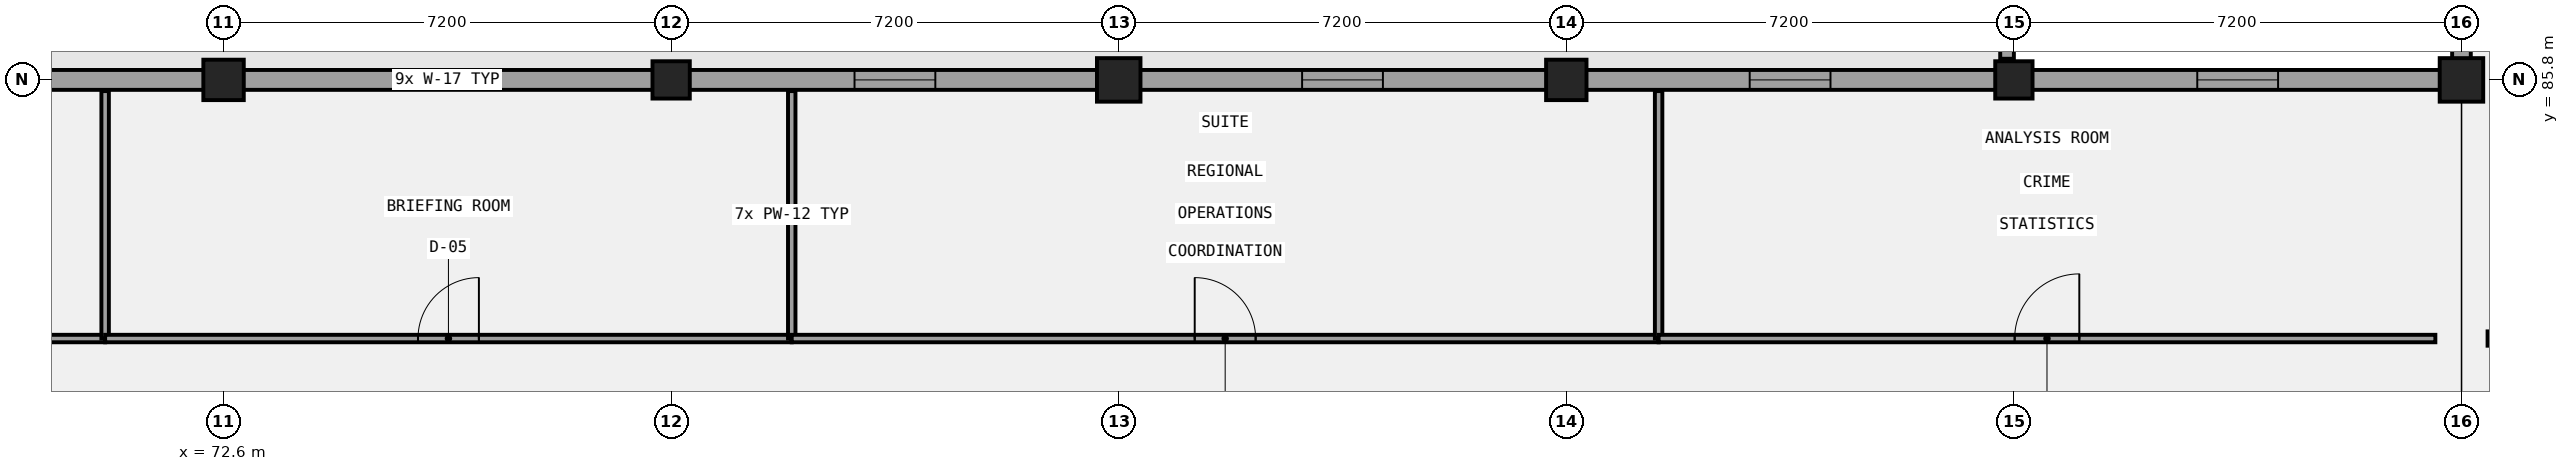
"""IFC4 building model, lengths in metres.
Left out: names, types, materials, properties, quantities, classifications, styles, units other than length and angle.
Written with IfcOpenShell. Run it as: python <this file> out.ifc"""

import sys

from ifc_helpers import new_model, si_unit, direction, frame, frame_2d, origin, origin_2d, place, context, subcontext, project, spatial, rectangle, extrude, element, fill, save


model = new_model("IFC4")
c1 = context("Model", 3, precision=1e-05, world=origin(), true_north=direction((0.0, 1.0)))
c2 = subcontext(c1, "Body", "Model", "MODEL_VIEW")
j1 = project(units=[si_unit("LENGTHUNIT", "METRE"), si_unit("PLANEANGLEUNIT", "RADIAN")], contexts=[c1])
p1 = place(None, origin())
s1 = spatial("IfcSite", under=j1, at=p1, CompositionType="ELEMENT")
p2 = place(p1, origin())
s2 = spatial("IfcBuilding", under=s1, at=p2, CompositionType="ELEMENT")
p3 = place(p2, frame((0.0, 0.0, 9.6)))
s3 = spatial("IfcBuildingStorey", under=s2, at=p3, CompositionType="ELEMENT", Elevation=9.6)
p4 = place(p3, frame((72.6, 85.8, 0.0), z_axis=(0.0, 0.0, 1.0), x_axis=(1.0, 0.0, 0.0)))
e1 = element("IfcColumn", 1, at=p4, inside=s3, PredefinedType="COLUMN", context=c2, shape_type="SweptSolid", body=[
    extrude(rectangle(XDim=0.65, YDim=0.65, at=origin_2d()), origin(), (0.0, 0.0, 1.0), 4.2),
])
p5 = place(p3, frame((79.8, 85.8, 0.0), z_axis=(0.0, 0.0, 1.0), x_axis=(1.0, 0.0, 0.0)))
e2 = element("IfcColumn", 2, at=p5, inside=s3, PredefinedType="COLUMN", context=c2, shape_type="SweptSolid", body=[
    extrude(rectangle(XDim=0.6, YDim=0.6, at=origin_2d()), origin(), (0.0, 0.0, 1.0), 4.2),
])
p6 = place(p3, frame((87.0, 85.8, 0.0), z_axis=(0.0, 0.0, 1.0), x_axis=(1.0, 0.0, 0.0)))
e3 = element("IfcColumn", 3, at=p6, inside=s3, PredefinedType="COLUMN", context=c2, shape_type="SweptSolid", body=[
    extrude(rectangle(XDim=0.7, YDim=0.7, at=origin_2d()), origin(), (0.0, 0.0, 1.0), 4.2),
])
p7 = place(p3, frame((94.2, 85.8, 0.0), z_axis=(0.0, 0.0, 1.0), x_axis=(1.0, 0.0, 0.0)))
e4 = element("IfcColumn", 4, at=p7, inside=s3, PredefinedType="COLUMN", context=c2, shape_type="SweptSolid", body=[
    extrude(rectangle(XDim=0.65, YDim=0.65, at=origin_2d()), origin(), (0.0, 0.0, 1.0), 4.2),
])
p8 = place(p3, frame((101.4, 85.8, 0.0), z_axis=(0.0, 0.0, 1.0), x_axis=(1.0, 0.0, 0.0)))
e5 = element("IfcColumn", 5, at=p8, inside=s3, PredefinedType="COLUMN", context=c2, shape_type="SweptSolid", body=[
    extrude(rectangle(XDim=0.6, YDim=0.6, at=origin_2d()), origin(), (0.0, 0.0, 1.0), 4.2),
])
p9 = place(p3, frame((108.6, 85.8, 0.0), z_axis=(0.0, 0.0, 1.0), x_axis=(1.0, 0.0, 0.0)))
e6 = element("IfcColumn", 6, at=p9, inside=s3, PredefinedType="COLUMN", context=c2, shape_type="SweptSolid", body=[
    extrude(rectangle(XDim=0.7, YDim=0.7, at=origin_2d()), origin(), (0.0, 0.0, 1.0), 4.2),
])
p10 = place(p3, frame((108.6, 92.81, 0.0), z_axis=(0.0, 0.0, 1.0), x_axis=(0.0, -1.0, 0.0)))
e7 = element("IfcWall", 7, at=p10, inside=s3, PredefinedType="SOLIDWALL", context=c2, shape_type="SweptSolid", body=[
    extrude(rectangle(XDim=6.86, YDim=0.3, at=frame_2d((3.43, 0.0))), origin(), (0.0, 0.0, 1.0), 3.04),
])
p11 = place(p10, frame((2.63, 0.0, 0.95)))
e8 = element("IfcOpeningElement", 8, at=p11, cuts=e7, PredefinedType="OPENING", context=c2, shape_type="SweptSolid", body=[
    extrude(rectangle(XDim=1.6, YDim=1.4, at=frame_2d((0.8, 0.7))), frame((0.0, 0.16, 0.0), z_axis=(0.0, -1.0, 0.0), x_axis=(1.0, 0.0, 0.0)), (0.0, 0.0, 1.0), 0.32),
])
p12 = place(p3, frame((108.76, 85.8, 0.0), z_axis=(0.0, 0.0, 1.0), x_axis=(-1.0, 0.0, 0.0)))
e9 = element("IfcWall", 9, at=p12, inside=s3, PredefinedType="SOLIDWALL", context=c2, shape_type="SweptSolid", body=[
    extrude(rectangle(XDim=101.12, YDim=0.32, at=frame_2d((50.56, 0.0))), origin(), (0.0, 0.0, 1.0), 2.94),
])
p13 = place(p12, frame((89.415, 0.0, 0.0)))
e10 = element("IfcOpeningElement", 10, at=p13, cuts=e9, PredefinedType="OPENING", context=c2, shape_type="SweptSolid", body=[
    extrude(rectangle(XDim=1.4, YDim=2.2, at=frame_2d((0.7, 1.1))), frame((0.0, 0.17, 0.0), z_axis=(0.0, -1.0, 0.0), x_axis=(1.0, 0.0, 0.0)), (0.0, 0.0, 1.0), 0.34),
])
p14 = place(p12, frame((96.71, 0.0, 1.0)))
e11 = element("IfcOpeningElement", 11, at=p14, cuts=e9, PredefinedType="OPENING", context=c2, shape_type="SweptSolid", body=[
    extrude(rectangle(XDim=1.3, YDim=1.65, at=frame_2d((0.65, 0.825))), frame((0.0, 0.17, 0.0), z_axis=(0.0, -1.0, 0.0), x_axis=(1.0, 0.0, 0.0)), (0.0, 0.0, 1.0), 0.34),
])
p15 = place(p12, frame((82.31, 0.0, 1.0)))
e12 = element("IfcOpeningElement", 12, at=p15, cuts=e9, PredefinedType="OPENING", context=c2, shape_type="SweptSolid", body=[
    extrude(rectangle(XDim=1.3, YDim=1.65, at=frame_2d((0.65, 0.825))), frame((0.0, 0.17, 0.0), z_axis=(0.0, -1.0, 0.0), x_axis=(1.0, 0.0, 0.0)), (0.0, 0.0, 1.0), 0.34),
])
p16 = place(p12, frame((75.11, 0.0, 1.0)))
e13 = element("IfcOpeningElement", 13, at=p16, cuts=e9, PredefinedType="OPENING", context=c2, shape_type="SweptSolid", body=[
    extrude(rectangle(XDim=1.3, YDim=1.65, at=frame_2d((0.65, 0.825))), frame((0.0, 0.17, 0.0), z_axis=(0.0, -1.0, 0.0), x_axis=(1.0, 0.0, 0.0)), (0.0, 0.0, 1.0), 0.34),
])
p17 = place(p12, frame((67.91, 0.0, 1.0)))
e14 = element("IfcOpeningElement", 14, at=p17, cuts=e9, PredefinedType="OPENING", context=c2, shape_type="SweptSolid", body=[
    extrude(rectangle(XDim=1.3, YDim=1.65, at=frame_2d((0.65, 0.825))), frame((0.0, 0.17, 0.0), z_axis=(0.0, -1.0, 0.0), x_axis=(1.0, 0.0, 0.0)), (0.0, 0.0, 1.0), 0.34),
])
p18 = place(p12, frame((60.71, 0.0, 1.0)))
e15 = element("IfcOpeningElement", 15, at=p18, cuts=e9, PredefinedType="OPENING", context=c2, shape_type="SweptSolid", body=[
    extrude(rectangle(XDim=1.3, YDim=1.65, at=frame_2d((0.65, 0.825))), frame((0.0, 0.17, 0.0), z_axis=(0.0, -1.0, 0.0), x_axis=(1.0, 0.0, 0.0)), (0.0, 0.0, 1.0), 0.34),
])
p19 = place(p12, frame((53.51, 0.0, 1.0)))
e16 = element("IfcOpeningElement", 16, at=p19, cuts=e9, PredefinedType="OPENING", context=c2, shape_type="SweptSolid", body=[
    extrude(rectangle(XDim=1.3, YDim=1.65, at=frame_2d((0.65, 0.825))), frame((0.0, 0.17, 0.0), z_axis=(0.0, -1.0, 0.0), x_axis=(1.0, 0.0, 0.0)), (0.0, 0.0, 1.0), 0.34),
])
p20 = place(p12, frame((46.31, 0.0, 1.0)))
e17 = element("IfcOpeningElement", 17, at=p20, cuts=e9, PredefinedType="OPENING", context=c2, shape_type="SweptSolid", body=[
    extrude(rectangle(XDim=1.3, YDim=1.65, at=frame_2d((0.65, 0.825))), frame((0.0, 0.17, 0.0), z_axis=(0.0, -1.0, 0.0), x_axis=(1.0, 0.0, 0.0)), (0.0, 0.0, 1.0), 0.34),
])
p21 = place(p12, frame((39.11, 0.0, 1.0)))
e18 = element("IfcOpeningElement", 18, at=p21, cuts=e9, PredefinedType="OPENING", context=c2, shape_type="SweptSolid", body=[
    extrude(rectangle(XDim=1.3, YDim=1.65, at=frame_2d((0.65, 0.825))), frame((0.0, 0.17, 0.0), z_axis=(0.0, -1.0, 0.0), x_axis=(1.0, 0.0, 0.0)), (0.0, 0.0, 1.0), 0.34),
])
p22 = place(p12, frame((31.91, 0.0, 1.0)))
e19 = element("IfcOpeningElement", 19, at=p22, cuts=e9, PredefinedType="OPENING", context=c2, shape_type="SweptSolid", body=[
    extrude(rectangle(XDim=1.3, YDim=1.65, at=frame_2d((0.65, 0.825))), frame((0.0, 0.17, 0.0), z_axis=(0.0, -1.0, 0.0), x_axis=(1.0, 0.0, 0.0)), (0.0, 0.0, 1.0), 0.34),
])
p23 = place(p12, frame((24.71, 0.0, 1.0)))
e20 = element("IfcOpeningElement", 20, at=p23, cuts=e9, PredefinedType="OPENING", context=c2, shape_type="SweptSolid", body=[
    extrude(rectangle(XDim=1.3, YDim=1.65, at=frame_2d((0.65, 0.825))), frame((0.0, 0.17, 0.0), z_axis=(0.0, -1.0, 0.0), x_axis=(1.0, 0.0, 0.0)), (0.0, 0.0, 1.0), 0.34),
])
p24 = place(p12, frame((17.51, 0.0, 1.0)))
e21 = element("IfcOpeningElement", 21, at=p24, cuts=e9, PredefinedType="OPENING", context=c2, shape_type="SweptSolid", body=[
    extrude(rectangle(XDim=1.3, YDim=1.65, at=frame_2d((0.65, 0.825))), frame((0.0, 0.17, 0.0), z_axis=(0.0, -1.0, 0.0), x_axis=(1.0, 0.0, 0.0)), (0.0, 0.0, 1.0), 0.34),
])
p25 = place(p12, frame((10.31, 0.0, 1.0)))
e22 = element("IfcOpeningElement", 22, at=p25, cuts=e9, PredefinedType="OPENING", context=c2, shape_type="SweptSolid", body=[
    extrude(rectangle(XDim=1.3, YDim=1.65, at=frame_2d((0.65, 0.825))), frame((0.0, 0.17, 0.0), z_axis=(0.0, -1.0, 0.0), x_axis=(1.0, 0.0, 0.0)), (0.0, 0.0, 1.0), 0.34),
])
p26 = place(p12, frame((3.11, 0.0, 1.0)))
e23 = element("IfcOpeningElement", 23, at=p26, cuts=e9, PredefinedType="OPENING", context=c2, shape_type="SweptSolid", body=[
    extrude(rectangle(XDim=1.3, YDim=1.65, at=frame_2d((0.65, 0.825))), frame((0.0, 0.17, 0.0), z_axis=(0.0, -1.0, 0.0), x_axis=(1.0, 0.0, 0.0)), (0.0, 0.0, 1.0), 0.34),
])
p27 = place(p3, frame((101.29, 92.816, 0.0), z_axis=(0.0, 0.0, 1.0), x_axis=(0.0, -1.0, 0.0)))
e24 = element("IfcWall", 24, at=p27, inside=s3, PredefinedType="PARAPET", context=c2, shape_type="SweptSolid", body=[
    extrude(rectangle(XDim=6.676, YDim=0.22, at=frame_2d((3.338, 0.0))), origin(), (0.0, 0.0, 1.0), 1.12),
])
p28 = place(p3, frame((109.02, 81.64, 0.0), z_axis=(0.0, 0.0, 1.0), x_axis=(1.0, 0.0, 0.0)))
e25 = element("IfcWall", 25, at=p28, inside=s3, PredefinedType="PARTITIONING", context=c2, shape_type="SweptSolid", body=[
    extrude(rectangle(XDim=5.86, YDim=0.23, at=frame_2d((2.93, 0.0))), origin(), (0.0, 0.0, 1.0), 3.94),
])
p29 = place(p28, frame((2.44, 0.0, 0.0)))
e26 = element("IfcOpeningElement", 26, at=p29, cuts=e25, PredefinedType="OPENING", context=c2, shape_type="SweptSolid", body=[
    extrude(rectangle(XDim=0.98, YDim=2.1, at=frame_2d((0.49, 1.05))), frame((0.0, 0.125, 0.0), z_axis=(0.0, -1.0, 0.0), x_axis=(1.0, 0.0, 0.0)), (0.0, 0.0, 1.0), 0.25),
])
p30 = place(p3, frame((58.2, 81.64, 0.0), z_axis=(0.0, 0.0, 1.0), x_axis=(1.0, 0.0, 0.0)))
e27 = element("IfcWall", 27, at=p30, inside=s3, PredefinedType="PARTITIONING", context=c2, shape_type="SweptSolid", body=[
    extrude(rectangle(XDim=12.495, YDim=0.12, at=frame_2d((6.248, 0.0))), origin(), (0.0, 0.0, 1.0), 3.94),
])
p31 = place(p30, frame((5.758, 0.0, 0.0)))
e28 = element("IfcOpeningElement", 28, at=p31, cuts=e27, PredefinedType="OPENING", context=c2, shape_type="SweptSolid", body=[
    extrude(rectangle(XDim=0.98, YDim=2.1, at=frame_2d((0.49, 1.05))), frame((0.0, 0.07, 0.0), z_axis=(0.0, -1.0, 0.0), x_axis=(1.0, 0.0, 0.0)), (0.0, 0.0, 1.0), 0.14),
])
p32 = place(p3, frame((70.695, 81.64, 0.0), z_axis=(0.0, 0.0, 1.0), x_axis=(0.0, 1.0, 0.0)))
e29 = element("IfcWall", 29, at=p32, inside=s3, PredefinedType="PARTITIONING", context=c2, shape_type="SweptSolid", body=[
    extrude(rectangle(XDim=3.98, YDim=0.12, at=frame_2d((1.99, 0.0))), origin(), (0.0, 0.0, 1.0), 3.94),
])
p33 = place(p3, frame((70.695, 81.64, 0.0), z_axis=(0.0, 0.0, 1.0), x_axis=(1.0, 0.0, 0.0)))
e30 = element("IfcWall", 30, at=p33, inside=s3, PredefinedType="PARTITIONING", context=c2, shape_type="SweptSolid", body=[
    extrude(rectangle(XDim=11.045, YDim=0.12, at=frame_2d((5.522, 0.0))), origin(), (0.0, 0.0, 1.0), 3.94),
])
p34 = place(p33, frame((5.032, 0.0, 0.0)))
e31 = element("IfcOpeningElement", 31, at=p34, cuts=e30, PredefinedType="OPENING", context=c2, shape_type="SweptSolid", body=[
    extrude(rectangle(XDim=0.98, YDim=2.22, at=frame_2d((0.49, 1.11))), frame((0.0, 0.07, 0.0), z_axis=(0.0, -1.0, 0.0), x_axis=(1.0, 0.0, 0.0)), (0.0, 0.0, 1.0), 0.14),
])
p35 = place(p3, frame((81.74, 81.64, 0.0), z_axis=(0.0, 0.0, 1.0), x_axis=(0.0, 1.0, 0.0)))
e32 = element("IfcWall", 32, at=p35, inside=s3, PredefinedType="PARTITIONING", context=c2, shape_type="SweptSolid", body=[
    extrude(rectangle(XDim=3.98, YDim=0.12, at=frame_2d((1.99, 0.0))), origin(), (0.0, 0.0, 1.0), 3.94),
])
p36 = place(p3, frame((81.74, 81.64, 0.0), z_axis=(0.0, 0.0, 1.0), x_axis=(1.0, 0.0, 0.0)))
e33 = element("IfcWall", 33, at=p36, inside=s3, PredefinedType="PARTITIONING", context=c2, shape_type="SweptSolid", body=[
    extrude(rectangle(XDim=13.945, YDim=0.12, at=frame_2d((6.973, 0.0))), origin(), (0.0, 0.0, 1.0), 3.94),
])
p37 = place(p36, frame((6.482, 0.0, 0.0)))
e34 = element("IfcOpeningElement", 34, at=p37, cuts=e33, PredefinedType="OPENING", context=c2, shape_type="SweptSolid", body=[
    extrude(rectangle(XDim=0.98, YDim=2.35, at=frame_2d((0.49, 1.175))), frame((0.0, 0.07, 0.0), z_axis=(0.0, -1.0, 0.0), x_axis=(1.0, 0.0, 0.0)), (0.0, 0.0, 1.0), 0.14),
])
p38 = place(p3, frame((95.685, 81.64, 0.0), z_axis=(0.0, 0.0, 1.0), x_axis=(0.0, 1.0, 0.0)))
e35 = element("IfcWall", 35, at=p38, inside=s3, PredefinedType="PARTITIONING", context=c2, shape_type="SweptSolid", body=[
    extrude(rectangle(XDim=3.98, YDim=0.12, at=frame_2d((1.99, 0.0))), origin(), (0.0, 0.0, 1.0), 3.94),
])
p39 = place(p3, frame((95.685, 81.64, 0.0), z_axis=(0.0, 0.0, 1.0), x_axis=(1.0, 0.0, 0.0)))
e36 = element("IfcWall", 36, at=p39, inside=s3, PredefinedType="PARTITIONING", context=c2, shape_type="SweptSolid", body=[
    extrude(rectangle(XDim=12.495, YDim=0.12, at=frame_2d((6.248, 0.0))), origin(), (0.0, 0.0, 1.0), 3.94),
])
p40 = place(p39, frame((5.728, 0.0, 0.0)))
e37 = element("IfcOpeningElement", 37, at=p40, cuts=e36, PredefinedType="OPENING", context=c2, shape_type="SweptSolid", body=[
    extrude(rectangle(XDim=1.04, YDim=2.1, at=frame_2d((0.52, 1.05))), frame((0.0, 0.07, 0.0), z_axis=(0.0, -1.0, 0.0), x_axis=(1.0, 0.0, 0.0)), (0.0, 0.0, 1.0), 0.14),
])
p41 = place(p22, origin())
e38 = element("IfcWindow", 38, at=p41, inside=s3, PartitioningType="SINGLE_PANEL", PredefinedType="WINDOW", context=c2, shape_type="SweptSolid", body=[
    extrude(rectangle(XDim=1.3, YDim=1.65, at=frame_2d((0.65, 0.825))), frame((0.0, 0.03, 0.0), z_axis=(0.0, -1.0, 0.0), x_axis=(1.0, 0.0, 0.0)), (0.0, 0.0, 1.0), 0.06),
])
fill(e19, e38)
p42 = place(p23, origin())
e39 = element("IfcWindow", 39, at=p42, inside=s3, PartitioningType="SINGLE_PANEL", PredefinedType="WINDOW", context=c2, shape_type="SweptSolid", body=[
    extrude(rectangle(XDim=1.3, YDim=1.65, at=frame_2d((0.65, 0.825))), frame((0.0, 0.03, 0.0), z_axis=(0.0, -1.0, 0.0), x_axis=(1.0, 0.0, 0.0)), (0.0, 0.0, 1.0), 0.06),
])
fill(e20, e39)
p43 = place(p24, origin())
e40 = element("IfcWindow", 40, at=p43, inside=s3, PartitioningType="SINGLE_PANEL", PredefinedType="WINDOW", context=c2, shape_type="SweptSolid", body=[
    extrude(rectangle(XDim=1.3, YDim=1.65, at=frame_2d((0.65, 0.825))), frame((0.0, 0.03, 0.0), z_axis=(0.0, -1.0, 0.0), x_axis=(1.0, 0.0, 0.0)), (0.0, 0.0, 1.0), 0.06),
])
fill(e21, e40)
p44 = place(p25, origin())
e41 = element("IfcWindow", 41, at=p44, inside=s3, PartitioningType="SINGLE_PANEL", PredefinedType="WINDOW", context=c2, shape_type="SweptSolid", body=[
    extrude(rectangle(XDim=1.3, YDim=1.65, at=frame_2d((0.65, 0.825))), frame((0.0, 0.03, 0.0), z_axis=(0.0, -1.0, 0.0), x_axis=(1.0, 0.0, 0.0)), (0.0, 0.0, 1.0), 0.06),
])
fill(e22, e41)
p45 = place(p26, origin())
e42 = element("IfcWindow", 42, at=p45, inside=s3, PartitioningType="SINGLE_PANEL", PredefinedType="WINDOW", context=c2, shape_type="SweptSolid", body=[
    extrude(rectangle(XDim=1.3, YDim=1.65, at=frame_2d((0.65, 0.825))), frame((0.0, 0.03, 0.0), z_axis=(0.0, -1.0, 0.0), x_axis=(1.0, 0.0, 0.0)), (0.0, 0.0, 1.0), 0.06),
])
fill(e23, e42)
p46 = place(p34, origin())
e43 = element("IfcDoor", 43, at=p46, inside=s3, OperationType="SINGLE_SWING_RIGHT", PredefinedType="DOOR", context=c2, shape_type="SweptSolid", body=[
    extrude(rectangle(XDim=0.98, YDim=2.22, at=frame_2d((0.49, 1.11))), frame((0.0, 0.025, 0.0), z_axis=(0.0, -1.0, 0.0), x_axis=(1.0, 0.0, 0.0)), (0.0, 0.0, 1.0), 0.05),
])
fill(e31, e43)
p47 = place(p37, origin())
e44 = element("IfcDoor", 44, at=p47, inside=s3, OperationType="SINGLE_SWING_LEFT", PredefinedType="DOOR", context=c2, shape_type="SweptSolid", body=[
    extrude(rectangle(XDim=0.98, YDim=2.35, at=frame_2d((0.49, 1.175))), frame((0.0, 0.025, 0.0), z_axis=(0.0, -1.0, 0.0), x_axis=(1.0, 0.0, 0.0)), (0.0, 0.0, 1.0), 0.05),
])
fill(e34, e44)
p48 = place(p40, origin())
e45 = element("IfcDoor", 45, at=p48, inside=s3, OperationType="SINGLE_SWING_RIGHT", PredefinedType="DOOR", context=c2, shape_type="SweptSolid", body=[
    extrude(rectangle(XDim=1.04, YDim=2.1, at=frame_2d((0.52, 1.05))), frame((0.0, 0.025, 0.0), z_axis=(0.0, -1.0, 0.0), x_axis=(1.0, 0.0, 0.0)), (0.0, 0.0, 1.0), 0.05),
])
fill(e37, e45)
save(model, sys.argv[1])
